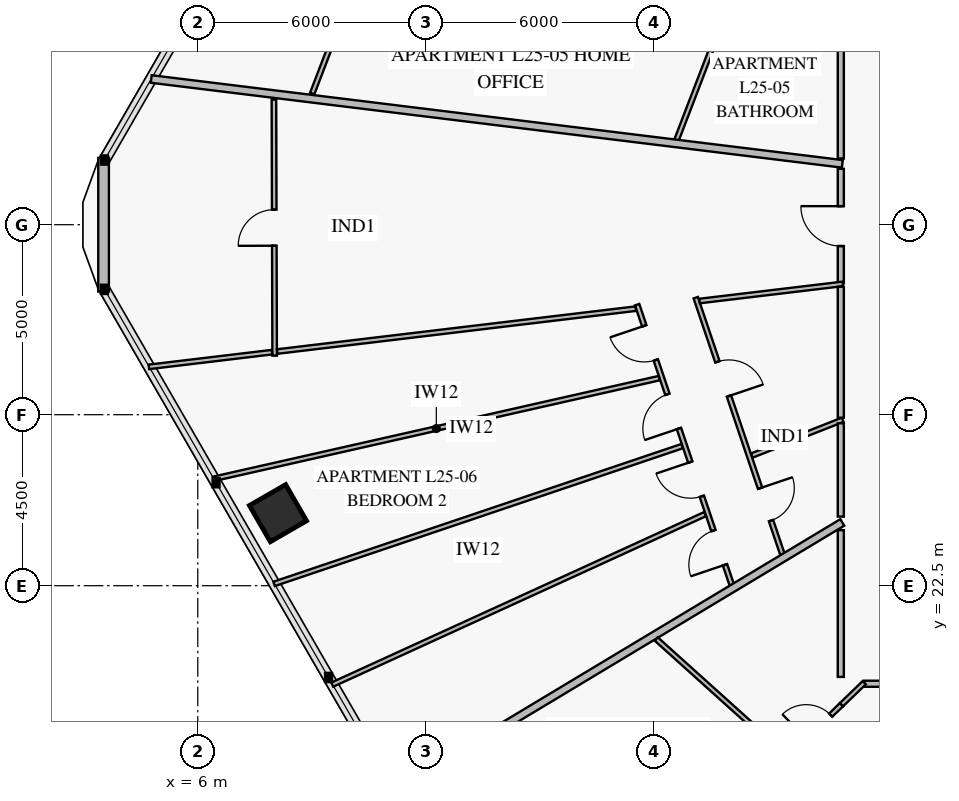
"""IFC4 building model, lengths in metres.
Left out: names, types, materials, properties, quantities, classifications, styles, units other than length and angle.
Written with IfcOpenShell. Run it as: python <this file> out.ifc"""

import sys

from ifc_helpers import new_model, si_unit, direction, frame, frame_2d, origin, origin_2d, place, context, subcontext, project, spatial, rectangle, extrude, element, fill, save


model = new_model("IFC4")
c1 = context("Model", 3, precision=1e-05, world=origin(), true_north=direction((0.0, 1.0)))
c2 = subcontext(c1, "Body", "Model", "MODEL_VIEW")
j1 = project(units=[si_unit("LENGTHUNIT", "METRE"), si_unit("PLANEANGLEUNIT", "RADIAN")], contexts=[c1])
p1 = place(None, origin())
s1 = spatial("IfcSite", under=j1, at=p1, CompositionType="ELEMENT")
p2 = place(p1, origin())
s2 = spatial("IfcBuilding", under=s1, at=p2, CompositionType="ELEMENT")
p3 = place(p2, frame((0.0, 0.0, 103.8)))
s3 = spatial("IfcBuildingStorey", under=s2, at=p3, CompositionType="ELEMENT", Elevation=103.8)
p4 = place(p3, frame((8.111, 24.408, 0.0), z_axis=(0.0, 0.0, 1.0), x_axis=(0.5, -0.866025403784, 0.0)))
e1 = element("IfcColumn", 1, at=p4, inside=s3, PredefinedType="COLUMN", context=c2, shape_type="SweptSolid", body=[
    extrude(rectangle(XDim=1.1, YDim=1.1, at=origin_2d()), origin(), (0.0, 0.0, 1.0), 3.55),
])
p5 = place(p3, frame((3.521, 30.242, 0.0), z_axis=(0.0, 0.0, 1.0), x_axis=(0.0, 1.0, 0.0)))
e2 = element("IfcWall", 2, at=p5, inside=s3, PredefinedType="SOLIDWALL", context=c2, shape_type="SweptSolid", body=[
    extrude(rectangle(XDim=3.515, YDim=0.28, at=frame_2d((1.758, 0.0))), origin(), (0.0, 0.0, 1.0), 3.55),
])
p6 = place(p3, frame((11.834, 42.806, 0.0), z_axis=(0.0, 0.0, 1.0), x_axis=(-0.358347623064, -0.933588228848, 0.0)))
e3 = element("IfcWall", 3, at=p6, inside=s3, PredefinedType="PARTITIONING", context=c2, shape_type="SweptSolid", body=[
    extrude(rectangle(XDim=7.877, YDim=0.12, at=frame_2d((3.938, 0.0))), origin(), (0.0, 0.0, 1.0), 2.85),
])
p7 = place(p6, frame((3.379, 0.0, 0.0)))
e4 = element("IfcOpeningElement", 4, at=p7, cuts=e3, PredefinedType="OPENING", context=c2, shape_type="SweptSolid", body=[
    extrude(rectangle(XDim=0.95, YDim=2.1, at=frame_2d((0.475, 1.05))), frame((0.0, 0.072, 0.0), z_axis=(0.0, -1.0, 0.0), x_axis=(1.0, 0.0, 0.0)), (0.0, 0.0, 1.0), 0.144),
])
p8 = place(p3, frame((8.004, 35.29, 0.0), z_axis=(0.0, 0.0, 1.0), x_axis=(0.00282658773, -0.999996005193, 0.0)))
e5 = element("IfcWall", 5, at=p8, inside=s3, PredefinedType="PARTITIONING", context=c2, shape_type="SweptSolid", body=[
    extrude(rectangle(XDim=6.737, YDim=0.12, at=frame_2d((3.369, 0.0))), origin(), (0.0, 0.0, 1.0), 2.8),
])
p9 = place(p8, frame((2.894, 0.0, 0.0)))
e6 = element("IfcOpeningElement", 6, at=p9, cuts=e5, PredefinedType="OPENING", context=c2, shape_type="SweptSolid", body=[
    extrude(rectangle(XDim=0.95, YDim=2.1, at=frame_2d((0.475, 1.05))), frame((0.0, 0.072, 0.0), z_axis=(0.0, -1.0, 0.0), x_axis=(1.0, 0.0, 0.0)), (0.0, 0.0, 1.0), 0.144),
])
p10 = place(p3, frame((19.103, 30.08, 0.0), z_axis=(0.0, 0.0, 1.0), x_axis=(0.319961945867, -0.947430394909, 0.0)))
e7 = element("IfcWall", 7, at=p10, inside=s3, PredefinedType="PARTITIONING", context=c2, shape_type="SweptSolid", body=[
    extrude(rectangle(XDim=7.174, YDim=0.12, at=frame_2d((3.587, 0.0))), origin(), (0.0, 0.0, 1.0), 2.85),
])
p11 = place(p10, frame((1.782, 0.0, 0.0)))
e8 = element("IfcOpeningElement", 8, at=p11, cuts=e7, PredefinedType="OPENING", context=c2, shape_type="SweptSolid", body=[
    extrude(rectangle(XDim=0.95, YDim=2.1, at=frame_2d((0.475, 1.05))), frame((0.0, 0.072, 0.0), z_axis=(0.0, -1.0, 0.0), x_axis=(1.0, 0.0, 0.0)), (0.0, 0.0, 1.0), 0.144),
])
p12 = place(p10, frame((5.292, 0.0, 0.0)))
e9 = element("IfcOpeningElement", 9, at=p12, cuts=e7, PredefinedType="OPENING", context=c2, shape_type="SweptSolid", body=[
    extrude(rectangle(XDim=0.9, YDim=2.1, at=frame_2d((0.45, 1.05))), frame((0.0, 0.072, 0.0), z_axis=(0.0, -1.0, 0.0), x_axis=(1.0, 0.0, 0.0)), (0.0, 0.0, 1.0), 0.144),
])
p13 = place(p3, frame((17.561, 29.896, 0.0), z_axis=(0.0, 0.0, 1.0), x_axis=(0.319947688878, -0.947435209596, 0.0)))
e10 = element("IfcWall", 10, at=p13, inside=s3, PredefinedType="PARTITIONING", context=c2, shape_type="SweptSolid", body=[
    extrude(rectangle(XDim=7.812, YDim=0.12, at=frame_2d((3.906, 0.0))), origin(), (0.0, 0.0, 1.0), 2.85),
])
p14 = place(p13, frame((0.587, 0.0, 0.0)))
e11 = element("IfcOpeningElement", 11, at=p14, cuts=e10, PredefinedType="OPENING", context=c2, shape_type="SweptSolid", body=[
    extrude(rectangle(XDim=0.95, YDim=2.1, at=frame_2d((0.475, 1.05))), frame((0.0, 0.072, 0.0), z_axis=(0.0, -1.0, 0.0), x_axis=(1.0, 0.0, 0.0)), (0.0, 0.0, 1.0), 0.144),
])
p15 = place(p13, frame((2.49, 0.0, 0.0)))
e12 = element("IfcOpeningElement", 12, at=p15, cuts=e10, PredefinedType="OPENING", context=c2, shape_type="SweptSolid", body=[
    extrude(rectangle(XDim=0.95, YDim=2.1, at=frame_2d((0.475, 1.05))), frame((0.0, 0.072, 0.0), z_axis=(0.0, -1.0, 0.0), x_axis=(1.0, 0.0, 0.0)), (0.0, 0.0, 1.0), 0.144),
])
p16 = place(p13, frame((4.372, 0.0, 0.0)))
e13 = element("IfcOpeningElement", 13, at=p16, cuts=e10, PredefinedType="OPENING", context=c2, shape_type="SweptSolid", body=[
    extrude(rectangle(XDim=0.95, YDim=2.1, at=frame_2d((0.475, 1.05))), frame((0.0, 0.072, 0.0), z_axis=(0.0, -1.0, 0.0), x_axis=(1.0, 0.0, 0.0)), (0.0, 0.0, 1.0), 0.144),
])
p17 = place(p13, frame((6.274, 0.0, 0.0)))
e14 = element("IfcOpeningElement", 14, at=p17, cuts=e10, PredefinedType="OPENING", context=c2, shape_type="SweptSolid", body=[
    extrude(rectangle(XDim=0.95, YDim=2.1, at=frame_2d((0.475, 1.05))), frame((0.0, 0.072, 0.0), z_axis=(0.0, -1.0, 0.0), x_axis=(1.0, 0.0, 0.0)), (0.0, 0.0, 1.0), 0.144),
])
p18 = place(p3, frame((22.92, 33.47, 0.0), z_axis=(0.0, 0.0, 1.0), x_axis=(0.0, -1.0, 0.0)))
e15 = element("IfcWall", 15, at=p18, inside=s3, PredefinedType="PARTITIONING", context=c2, shape_type="SweptSolid", body=[
    extrude(rectangle(XDim=3.014, YDim=0.16, at=frame_2d((1.507, 0.0))), origin(), (0.0, 0.0, 1.0), 3.55),
])
p19 = place(p18, frame((0.982, 0.0, 0.0)))
e16 = element("IfcOpeningElement", 16, at=p19, cuts=e15, PredefinedType="OPENING", context=c2, shape_type="SweptSolid", body=[
    extrude(rectangle(XDim=1.05, YDim=2.15, at=frame_2d((0.525, 1.075))), frame((0.0, 0.092, 0.0), z_axis=(0.0, -1.0, 0.0), x_axis=(1.0, 0.0, 0.0)), (0.0, 0.0, 1.0), 0.184),
])
p20 = place(p3, frame((22.938, 19.368, 0.0), z_axis=(0.0, 0.0, 1.0), x_axis=(-0.718812006411, -0.695204501884, 0.0)))
e17 = element("IfcWall", 17, at=p20, inside=s3, PredefinedType="PARTITIONING", context=c2, shape_type="SweptSolid", body=[
    extrude(rectangle(XDim=2.006, YDim=0.12, at=frame_2d((1.003, 0.0))), origin(), (0.0, 0.0, 1.0), 3.55),
])
p21 = place(p20, frame((0.393, 0.0, 0.0)))
e18 = element("IfcOpeningElement", 18, at=p21, cuts=e17, PredefinedType="OPENING", context=c2, shape_type="SweptSolid", body=[
    extrude(rectangle(XDim=0.9, YDim=2.1, at=frame_2d((0.45, 1.05))), frame((0.0, 0.072, 0.0), z_axis=(0.0, -1.0, 0.0), x_axis=(1.0, 0.0, 0.0)), (0.0, 0.0, 1.0), 0.144),
])
p22 = place(p3, frame((23.537, 19.92, 0.0), z_axis=(0.0, 0.0, 1.0), x_axis=(1.0, 0.0, 0.0)))
e19 = element("IfcWall", 19, at=p22, inside=s3, PredefinedType="PARTITIONING", context=c2, shape_type="SweptSolid", body=[
    extrude(rectangle(XDim=6.679, YDim=0.16, at=frame_2d((3.339, 0.0))), origin(), (0.0, 0.0, 1.0), 2.85),
])
p23 = place(p22, frame((2.814, 0.0, 0.0)))
e20 = element("IfcOpeningElement", 20, at=p23, cuts=e19, PredefinedType="OPENING", context=c2, shape_type="SweptSolid", body=[
    extrude(rectangle(XDim=1.05, YDim=2.15, at=frame_2d((0.525, 1.075))), frame((0.0, 0.092, 0.0), z_axis=(0.0, -1.0, 0.0), x_axis=(1.0, 0.0, 0.0)), (0.0, 0.0, 1.0), 0.184),
])
p24 = place(p3, frame((20.409, 38.945, 0.0), z_axis=(0.0, 0.0, 1.0), x_axis=(-0.358374938657, -0.933577743598, 0.0)))
e21 = element("IfcWall", 21, at=p24, inside=s3, PredefinedType="PARTITIONING", context=c2, shape_type="SweptSolid", body=[
    extrude(rectangle(XDim=5.092, YDim=0.12, at=frame_2d((2.546, 0.0))), origin(), (0.0, 0.0, 1.0), 2.85),
])
p25 = place(p3, frame((22.96, 33.601, 0.0), z_axis=(0.0, 0.0, 1.0), x_axis=(-0.99254551981, 0.121874489148, 0.0)))
e22 = element("IfcWall", 22, at=p25, inside=s3, PredefinedType="PARTITIONING", context=c2, shape_type="SweptSolid", body=[
    extrude(rectangle(XDim=18.321, YDim=0.2, at=frame_2d((9.161, 0.0))), origin(), (0.0, 0.0, 1.0), 2.8),
])
p26 = place(p3, frame((22.97, 26.867, 0.0), z_axis=(0.0, 0.0, 1.0), x_axis=(-0.930402504974, -0.366539464095, 0.0)))
e23 = element("IfcWall", 23, at=p26, inside=s3, PredefinedType="PARTITIONING", context=c2, shape_type="SweptSolid", body=[
    extrude(rectangle(XDim=2.571, YDim=0.12, at=frame_2d((1.286, 0.0))), origin(), (0.0, 0.0, 1.0), 3.55),
])
p27 = place(p3, frame((18.142, 27.962, 0.0), z_axis=(0.0, 0.0, 1.0), x_axis=(-0.975378348773, -0.220538152583, 0.0)))
e24 = element("IfcWall", 24, at=p27, inside=s3, PredefinedType="PARTITIONING", context=c2, shape_type="SweptSolid", body=[
    extrude(rectangle(XDim=12.026, YDim=0.12, at=frame_2d((6.013, 0.0))), origin(), (0.0, 0.0, 1.0), 2.8),
])
p28 = place(p3, frame((18.746, 26.173, 0.0), z_axis=(0.0, 0.0, 1.0), x_axis=(-0.947430912787, -0.319960412389, 0.0)))
e25 = element("IfcWall", 25, at=p28, inside=s3, PredefinedType="PARTITIONING", context=c2, shape_type="SweptSolid", body=[
    extrude(rectangle(XDim=11.334, YDim=0.12, at=frame_2d((5.667, 0.0))), origin(), (0.0, 0.0, 1.0), 2.8),
])
p29 = place(p3, frame((19.35, 24.384, 0.0), z_axis=(0.0, 0.0, 1.0), x_axis=(-0.909372754927, -0.415982202259, 0.0)))
e26 = element("IfcWall", 26, at=p29, inside=s3, PredefinedType="PARTITIONING", context=c2, shape_type="SweptSolid", body=[
    extrude(rectangle(XDim=10.79, YDim=0.12, at=frame_2d((5.395, 0.0))), origin(), (0.0, 0.0, 1.0), 2.8),
])
p30 = place(p3, frame((22.97, 30.442, 0.0), z_axis=(0.0, 0.0, 1.0), x_axis=(-0.992919730028, -0.118787245617, 0.0)))
e27 = element("IfcWall", 27, at=p30, inside=s3, PredefinedType="PARTITIONING", context=c2, shape_type="SweptSolid", body=[
    extrude(rectangle(XDim=3.792, YDim=0.12, at=frame_2d((1.896, 0.0))), origin(), (0.0, 0.0, 1.0), 3.55),
])
p31 = place(p3, frame((17.525, 29.79, 0.0), z_axis=(0.0, 0.0, 1.0), x_axis=(-0.992925874221, -0.11873587622, 0.0)))
e28 = element("IfcWall", 28, at=p31, inside=s3, PredefinedType="PARTITIONING", context=c2, shape_type="SweptSolid", body=[
    extrude(rectangle(XDim=9.501, YDim=0.12, at=frame_2d((4.751, 0.0))), origin(), (0.0, 0.0, 1.0), 2.8),
])
p32 = place(p3, frame((7.954, 28.646, 0.0), z_axis=(0.0, 0.0, 1.0), x_axis=(-0.992930883054, -0.11869398248, 0.0)))
e29 = element("IfcWall", 29, at=p32, inside=s3, PredefinedType="PARTITIONING", context=c2, shape_type="SweptSolid", body=[
    extrude(rectangle(XDim=3.264, YDim=0.12, at=frame_2d((1.632, 0.0))), origin(), (0.0, 0.0, 1.0), 3.55),
])
p33 = place(p3, frame((22.96, 24.165, 0.0), z_axis=(0.0, 0.0, 1.0), x_axis=(-0.857163744899, -0.515043992714, 0.0)))
e30 = element("IfcWall", 30, at=p33, inside=s3, PredefinedType="PARTITIONING", context=c2, shape_type="SweptSolid", body=[
    extrude(rectangle(XDim=13.75, YDim=0.2, at=frame_2d((6.875, 0.0))), origin(), (0.0, 0.0, 1.0), 2.8),
])
p34 = place(p3, frame((23.537, 19.948, 0.0), z_axis=(0.0, 0.0, 1.0), x_axis=(-0.719012767995, -0.694996862914, 0.0)))
e31 = element("IfcWall", 31, at=p34, inside=s3, PredefinedType="PARTITIONING", context=c2, shape_type="SweptSolid", body=[
    extrude(rectangle(XDim=0.833, YDim=0.12, at=frame_2d((0.417, 0.0))), origin(), (0.0, 0.0, 1.0), 2.85),
])
p35 = place(p3, frame((18.064, 21.097, 0.0), z_axis=(0.0, 0.0, 1.0), x_axis=(0.743156109258, -0.669118074238, 0.0)))
e32 = element("IfcWall", 32, at=p35, inside=s3, PredefinedType="PARTITIONING", context=c2, shape_type="SweptSolid", body=[
    extrude(rectangle(XDim=4.574, YDim=0.12, at=frame_2d((2.287, 0.0))), origin(), (0.0, 0.0, 1.0), 3.1),
])
p36 = place(p3, frame((30.386, 19.96, 0.0), z_axis=(0.0, 0.0, 1.0), x_axis=(-0.422626983595, -0.906303719918, 0.0)))
e33 = element("IfcWall", 33, at=p36, inside=s3, PredefinedType="PARTITIONING", context=c2, shape_type="SweptSolid", body=[
    extrude(rectangle(XDim=18.667, YDim=0.2, at=frame_2d((9.334, 0.0))), origin(), (0.0, 0.0, 1.0), 2.8),
])
p37 = place(p3, frame((22.92, 37.867, 0.0), z_axis=(0.0, 0.0, 1.0), x_axis=(0.0, -1.0, 0.0)))
e34 = element("IfcWall", 34, at=p37, inside=s3, PredefinedType="PARTITIONING", context=c2, shape_type="SweptSolid", body=[
    extrude(rectangle(XDim=4.125, YDim=0.16, at=frame_2d((2.062, 0.0))), origin(), (0.0, 0.0, 1.0), 2.85),
])
p38 = place(p3, frame((22.92, 30.367, 0.0), z_axis=(0.0, 0.0, 1.0), x_axis=(0.0, -1.0, 0.0)))
e35 = element("IfcWall", 35, at=p38, inside=s3, PredefinedType="PARTITIONING", context=c2, shape_type="SweptSolid", body=[
    extrude(rectangle(XDim=3.447, YDim=0.16, at=frame_2d((1.723, 0.0))), origin(), (0.0, 0.0, 1.0), 2.85),
])
p39 = place(p3, frame((22.92, 26.774, 0.0), z_axis=(0.0, 0.0, 1.0), x_axis=(0.0, -1.0, 0.0)))
e36 = element("IfcWall", 36, at=p39, inside=s3, PredefinedType="PARTITIONING", context=c2, shape_type="SweptSolid", body=[
    extrude(rectangle(XDim=2.456, YDim=0.16, at=frame_2d((1.228, 0.0))), origin(), (0.0, 0.0, 1.0), 3.55),
])
p40 = place(p3, frame((22.92, 23.961, 0.0), z_axis=(0.0, 0.0, 1.0), x_axis=(0.0, -1.0, 0.0)))
e37 = element("IfcWall", 37, at=p40, inside=s3, PredefinedType="PARTITIONING", context=c2, shape_type="SweptSolid", body=[
    extrude(rectangle(XDim=3.861, YDim=0.16, at=frame_2d((1.931, 0.0))), origin(), (0.0, 0.0, 1.0), 3.55),
])
p41 = place(p9, frame((0.95, 0.0, 0.0), z_axis=(0.0, 0.0, 1.0), x_axis=(-1.0, 0.0, 0.0)))
e38 = element("IfcDoor", 38, at=p41, inside=s3, OperationType="SINGLE_SWING_LEFT", PredefinedType="DOOR", context=c2, shape_type="SweptSolid", body=[
    extrude(rectangle(XDim=0.95, YDim=2.1, at=frame_2d((0.475, 1.05))), frame((0.0, 0.025, 0.0), z_axis=(0.0, -1.0, 0.0), x_axis=(1.0, 0.0, 0.0)), (0.0, 0.0, 1.0), 0.05),
])
fill(e6, e38)
p42 = place(p11, origin())
e39 = element("IfcDoor", 39, at=p42, inside=s3, OperationType="SINGLE_SWING_RIGHT", PredefinedType="DOOR", context=c2, shape_type="SweptSolid", body=[
    extrude(rectangle(XDim=0.95, YDim=2.1, at=frame_2d((0.475, 1.05))), frame((0.0, 0.025, 0.0), z_axis=(0.0, -1.0, 0.0), x_axis=(1.0, 0.0, 0.0)), (0.0, 0.0, 1.0), 0.05),
])
fill(e8, e39)
p43 = place(p12, origin())
e40 = element("IfcDoor", 40, at=p43, inside=s3, OperationType="SINGLE_SWING_LEFT", PredefinedType="DOOR", context=c2, shape_type="SweptSolid", body=[
    extrude(rectangle(XDim=0.9, YDim=2.1, at=frame_2d((0.45, 1.05))), frame((0.0, 0.025, 0.0), z_axis=(0.0, -1.0, 0.0), x_axis=(1.0, 0.0, 0.0)), (0.0, 0.0, 1.0), 0.05),
])
fill(e9, e40)
p44 = place(p14, frame((0.95, 0.0, 0.0), z_axis=(0.0, 0.0, 1.0), x_axis=(-1.0, 0.0, 0.0)))
e41 = element("IfcDoor", 41, at=p44, inside=s3, OperationType="SINGLE_SWING_RIGHT", PredefinedType="DOOR", context=c2, shape_type="SweptSolid", body=[
    extrude(rectangle(XDim=0.95, YDim=2.1, at=frame_2d((0.475, 1.05))), frame((0.0, 0.025, 0.0), z_axis=(0.0, -1.0, 0.0), x_axis=(1.0, 0.0, 0.0)), (0.0, 0.0, 1.0), 0.05),
])
fill(e11, e41)
p45 = place(p15, frame((0.95, 0.0, 0.0), z_axis=(0.0, 0.0, 1.0), x_axis=(-1.0, 0.0, 0.0)))
e42 = element("IfcDoor", 42, at=p45, inside=s3, OperationType="SINGLE_SWING_LEFT", PredefinedType="DOOR", context=c2, shape_type="SweptSolid", body=[
    extrude(rectangle(XDim=0.95, YDim=2.1, at=frame_2d((0.475, 1.05))), frame((0.0, 0.025, 0.0), z_axis=(0.0, -1.0, 0.0), x_axis=(1.0, 0.0, 0.0)), (0.0, 0.0, 1.0), 0.05),
])
fill(e12, e42)
p46 = place(p16, frame((0.95, 0.0, 0.0), z_axis=(0.0, 0.0, 1.0), x_axis=(-1.0, 0.0, 0.0)))
e43 = element("IfcDoor", 43, at=p46, inside=s3, OperationType="SINGLE_SWING_RIGHT", PredefinedType="DOOR", context=c2, shape_type="SweptSolid", body=[
    extrude(rectangle(XDim=0.95, YDim=2.1, at=frame_2d((0.475, 1.05))), frame((0.0, 0.025, 0.0), z_axis=(0.0, -1.0, 0.0), x_axis=(1.0, 0.0, 0.0)), (0.0, 0.0, 1.0), 0.05),
])
fill(e13, e43)
p47 = place(p17, frame((0.95, 0.0, 0.0), z_axis=(0.0, 0.0, 1.0), x_axis=(-1.0, 0.0, 0.0)))
e44 = element("IfcDoor", 44, at=p47, inside=s3, OperationType="SINGLE_SWING_LEFT", PredefinedType="DOOR", context=c2, shape_type="SweptSolid", body=[
    extrude(rectangle(XDim=0.95, YDim=2.1, at=frame_2d((0.475, 1.05))), frame((0.0, 0.025, 0.0), z_axis=(0.0, -1.0, 0.0), x_axis=(1.0, 0.0, 0.0)), (0.0, 0.0, 1.0), 0.05),
])
fill(e14, e44)
p48 = place(p19, frame((1.05, 0.0, 0.0), z_axis=(0.0, 0.0, 1.0), x_axis=(-1.0, 0.0, 0.0)))
e45 = element("IfcDoor", 45, at=p48, inside=s3, OperationType="SINGLE_SWING_RIGHT", PredefinedType="DOOR", context=c2, shape_type="SweptSolid", body=[
    extrude(rectangle(XDim=1.05, YDim=2.15, at=frame_2d((0.525, 1.075))), frame((0.0, 0.025, 0.0), z_axis=(0.0, -1.0, 0.0), x_axis=(1.0, 0.0, 0.0)), (0.0, 0.0, 1.0), 0.05),
])
fill(e16, e45)
p49 = place(p21, frame((0.9, 0.0, 0.0), z_axis=(0.0, 0.0, 1.0), x_axis=(-1.0, 0.0, 0.0)))
e46 = element("IfcDoor", 46, at=p49, inside=s3, OperationType="SINGLE_SWING_LEFT", PredefinedType="DOOR", context=c2, shape_type="SweptSolid", body=[
    extrude(rectangle(XDim=0.9, YDim=2.1, at=frame_2d((0.45, 1.05))), frame((0.0, 0.025, 0.0), z_axis=(0.0, -1.0, 0.0), x_axis=(1.0, 0.0, 0.0)), (0.0, 0.0, 1.0), 0.05),
])
fill(e18, e46)
save(model, sys.argv[1])
